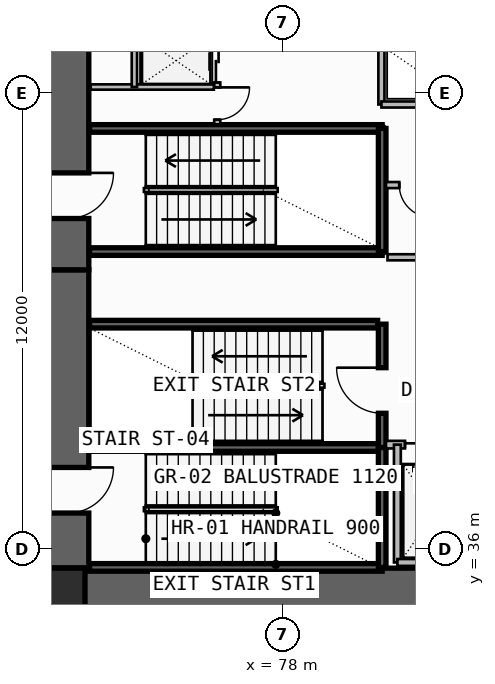
"""IFC4 building model, lengths in metres.
Left out: names, types, materials, properties, quantities, classifications, styles, units other than length and angle.
Written with IfcOpenShell. Run it as: python <this file> out.ifc"""

import sys

from ifc_helpers import new_model, si_unit, direction, frame, frame_2d, origin, origin_2d, place, context, subcontext, project, spatial, rectangle, extrude, element, fill, save


model = new_model("IFC4")
c1 = context("Model", 3, precision=1e-05, world=origin(), true_north=direction((0.0, 1.0)))
c2 = subcontext(c1, "Body", "Model", "MODEL_VIEW")
j1 = project(units=[si_unit("LENGTHUNIT", "METRE"), si_unit("PLANEANGLEUNIT", "RADIAN")], contexts=[c1])
p1 = place(None, origin())
s1 = spatial("IfcSite", under=j1, at=p1, CompositionType="ELEMENT")
p2 = place(p1, origin())
s2 = spatial("IfcBuilding", under=s1, at=p2, CompositionType="ELEMENT")
p3 = place(p2, frame((0.0, 0.0, 4.5)))
s3 = spatial("IfcBuildingStorey", under=s2, at=p3, CompositionType="ELEMENT", Elevation=4.5)
p4 = place(p3, frame((72.35, 35.5, -0.32), z_axis=(0.0, 0.0, 1.0), x_axis=(0.0, 1.0, 0.0)))
e1 = element("IfcWall", 1, at=p4, inside=s3, PredefinedType="SHEAR", context=c2, shape_type="SweptSolid", body=[
    extrude(rectangle(XDim=7.85, YDim=1.1, at=frame_2d((3.925, 0.0))), origin(), (0.0, 0.0, 1.0), 4.5),
])
p5 = place(p4, frame((1.45, 0.0, 0.32)))
e2 = element("IfcOpeningElement", 2, at=p5, cuts=e1, PredefinedType="OPENING", context=c2, shape_type="SweptSolid", body=[
    extrude(rectangle(XDim=1.2, YDim=2.2, at=frame_2d((0.6, 1.1))), frame((0.0, 0.56, 0.0), z_axis=(0.0, -1.0, 0.0), x_axis=(1.0, 0.0, 0.0)), (0.0, 0.0, 1.0), 1.12),
])
p6 = place(p3, frame((71.8, 34.95, -0.32), z_axis=(0.0, 0.0, 1.0), x_axis=(1.0, 0.0, 0.0)))
e3 = element("IfcWall", 3, at=p6, inside=s3, PredefinedType="SHEAR", context=c2, shape_type="SweptSolid", body=[
    extrude(rectangle(XDim=14.3, YDim=1.1, at=frame_2d((7.15, 0.0))), origin(), (0.0, 0.0, 1.0), 4.5),
])
p7 = place(p3, frame((72.35, 43.35, -0.32), z_axis=(0.0, 0.0, 1.0), x_axis=(0.0, 1.0, 0.0)))
e4 = element("IfcWall", 4, at=p7, inside=s3, PredefinedType="SHEAR", context=c2, shape_type="SweptSolid", body=[
    extrude(rectangle(XDim=12.7, YDim=1.1, at=frame_2d((6.35, 0.0))), origin(), (0.0, 0.0, 1.0), 4.5),
])
p8 = place(p7, frame((1.35, 0.0, 0.32)))
e5 = element("IfcOpeningElement", 5, at=p8, cuts=e4, PredefinedType="OPENING", context=c2, shape_type="SweptSolid", body=[
    extrude(rectangle(XDim=1.2, YDim=2.2, at=frame_2d((0.6, 1.1))), frame((0.0, 0.56, 0.0), z_axis=(0.0, -1.0, 0.0), x_axis=(1.0, 0.0, 0.0)), (0.0, 0.0, 1.0), 1.12),
])
p9 = place(p3, frame((72.0, 34.7, 0.0), z_axis=(0.0, 0.0, 1.0), x_axis=(1.0, 0.0, 0.0)))
e6 = element("IfcColumn", 6, at=p9, inside=s3, PredefinedType="COLUMN", context=c2, shape_type="SweptSolid", body=[
    extrude(rectangle(XDim=1.6, YDim=1.6, at=origin_2d()), origin(), (0.0, 0.0, 1.0), 4.5),
])
for number, where, z_axis, x_axis in (
    (7, (72.92, 35.52, -0.32), (0.0, 0.0, 1.0), (1.0, 0.0, 0.0)),
    (8, (72.92, 38.675, -0.32), (0.0, 0.0, 1.0), (1.0, 0.0, 0.0)),
):
    element("IfcWall", number, at=place(p3, frame(where, z_axis=z_axis, x_axis=x_axis)), inside=s3, PredefinedType="SOLIDWALL", context=c2, shape_type="SweptSolid", body=[
        extrude(rectangle(XDim=7.7, YDim=0.2, at=frame_2d((3.85, 0.0))), origin(), (0.0, 0.0, 1.0), 4.5),
    ])
p10 = place(p3, frame((80.62, 35.52, -0.32), z_axis=(0.0, 0.0, 1.0), x_axis=(0.0, 1.0, 0.0)))
e9 = element("IfcWall", 9, at=p10, inside=s3, PredefinedType="SOLIDWALL", context=c2, shape_type="SweptSolid", body=[
    extrude(rectangle(XDim=3.155, YDim=0.2, at=frame_2d((1.578, 0.0))), origin(), (0.0, 0.0, 1.0), 4.5),
])
p11 = place(p3, frame((80.62, 38.675, -0.32), z_axis=(0.0, 0.0, 1.0), x_axis=(0.0, 1.0, 0.0)))
e10 = element("IfcWall", 10, at=p11, inside=s3, PredefinedType="SOLIDWALL", context=c2, shape_type="SweptSolid", body=[
    extrude(rectangle(XDim=3.245, YDim=0.2, at=frame_2d((1.623, 0.0))), origin(), (0.0, 0.0, 1.0), 4.5),
])
p12 = place(p11, frame((0.9, 0.0, 0.32)))
e11 = element("IfcOpeningElement", 11, at=p12, cuts=e10, PredefinedType="OPENING", context=c2, shape_type="SweptSolid", body=[
    extrude(rectangle(XDim=1.2, YDim=2.2, at=frame_2d((0.6, 1.1))), frame((0.0, 0.11, 0.0), z_axis=(0.0, -1.0, 0.0), x_axis=(1.0, 0.0, 0.0)), (0.0, 0.0, 1.0), 0.22),
])
p13 = place(p3, frame((80.72, 38.75, 0.0), z_axis=(0.0, 0.0, 1.0), x_axis=(1.0, 0.0, 0.0)))
e12 = element("IfcWall", 12, at=p13, inside=s3, PredefinedType="SOLIDWALL", context=c2, shape_type="SweptSolid", body=[
    extrude(rectangle(XDim=4.26, YDim=0.2, at=frame_2d((2.13, 0.0))), origin(), (0.0, 0.0, 1.0), 4.18),
])
p14 = place(p13, frame((0.5, 0.0, 0.0)))
e13 = element("IfcOpeningElement", 13, at=p14, cuts=e12, PredefinedType="OPENING", context=c2, shape_type="SweptSolid", body=[
    extrude(rectangle(XDim=1.3, YDim=2.3, at=frame_2d((0.65, 1.15))), frame((0.0, 0.11, 0.0), z_axis=(0.0, -1.0, 0.0), x_axis=(1.0, 0.0, 0.0)), (0.0, 0.0, 1.0), 0.22),
])
p15 = place(p13, frame((2.45, 0.0, 0.0)))
e14 = element("IfcOpeningElement", 14, at=p15, cuts=e12, PredefinedType="OPENING", context=c2, shape_type="SweptSolid", body=[
    extrude(rectangle(XDim=1.3, YDim=2.3, at=frame_2d((0.65, 1.15))), frame((0.0, 0.11, 0.0), z_axis=(0.0, -1.0, 0.0), x_axis=(1.0, 0.0, 0.0)), (0.0, 0.0, 1.0), 0.22),
])
p16 = place(p3, frame((81.02, 35.65, 0.0), z_axis=(0.0, 0.0, 1.0), x_axis=(0.0, 1.0, 0.0)))
e15 = element("IfcWall", 15, at=p16, inside=s3, PredefinedType="SOLIDWALL", context=c2, shape_type="SweptSolid", body=[
    extrude(rectangle(XDim=3.1, YDim=0.18, at=frame_2d((1.55, 0.0))), origin(), (0.0, 0.0, 1.0), 4.18),
])
p17 = place(p3, frame((81.02, 35.65, 0.0), z_axis=(0.0, 0.0, 1.0), x_axis=(1.0, 0.0, 0.0)))
e16 = element("IfcWall", 16, at=p17, inside=s3, PredefinedType="SOLIDWALL", context=c2, shape_type="SweptSolid", body=[
    extrude(rectangle(XDim=3.93, YDim=0.18, at=frame_2d((1.965, 0.0))), origin(), (0.0, 0.0, 1.0), 4.18),
])
p18 = place(p3, frame((72.92, 41.92, -0.32), z_axis=(0.0, 0.0, 1.0), x_axis=(1.0, 0.0, 0.0)))
e17 = element("IfcWall", 17, at=p18, inside=s3, PredefinedType="SOLIDWALL", context=c2, shape_type="SweptSolid", body=[
    extrude(rectangle(XDim=7.58, YDim=0.2, at=frame_2d((3.79, 0.0))), origin(), (0.0, 0.0, 1.0), 4.5),
])
for number, where, z_axis, x_axis in (
    (18, (72.92, 43.83, -0.32), (0.0, 0.0, 1.0), (1.0, 0.0, 0.0)),
    (19, (72.92, 47.07, -0.32), (0.0, 0.0, 1.0), (1.0, 0.0, 0.0)),
):
    element("IfcWall", number, at=place(p3, frame(where, z_axis=z_axis, x_axis=x_axis)), inside=s3, PredefinedType="SOLIDWALL", context=c2, shape_type="SweptSolid", body=[
        extrude(rectangle(XDim=7.7, YDim=0.2, at=frame_2d((3.85, 0.0))), origin(), (0.0, 0.0, 1.0), 4.5),
    ])
p19 = place(p3, frame((80.62, 43.83, -0.32), z_axis=(0.0, 0.0, 1.0), x_axis=(0.0, 1.0, 0.0)))
e20 = element("IfcWall", 20, at=p19, inside=s3, PredefinedType="SOLIDWALL", context=c2, shape_type="SweptSolid", body=[
    extrude(rectangle(XDim=3.24, YDim=0.2, at=frame_2d((1.62, 0.0))), origin(), (0.0, 0.0, 1.0), 4.5),
])
p20 = place(p3, frame((80.72, 45.58, 0.0), z_axis=(0.0, 0.0, 1.0), x_axis=(1.0, 0.0, 0.0)))
e21 = element("IfcWall", 21, at=p20, inside=s3, PredefinedType="PLUMBINGWALL", context=c2, shape_type="SweptSolid", body=[
    extrude(rectangle(XDim=4.23, YDim=0.16, at=frame_2d((2.115, 0.0))), origin(), (0.0, 0.0, 1.0), 4.18),
])
p21 = place(p20, frame((0.35, 0.0, 0.0)))
e22 = element("IfcOpeningElement", 22, at=p21, cuts=e21, PredefinedType="OPENING", context=c2, shape_type="SweptSolid", body=[
    extrude(rectangle(XDim=0.85, YDim=2.05, at=frame_2d((0.425, 1.025))), frame((0.0, 0.09, 0.0), z_axis=(0.0, -1.0, 0.0), x_axis=(1.0, 0.0, 0.0)), (0.0, 0.0, 1.0), 0.18),
])
p22 = place(p20, frame((2.35, 0.0, 0.0)))
e23 = element("IfcOpeningElement", 23, at=p22, cuts=e21, PredefinedType="OPENING", context=c2, shape_type="SweptSolid", body=[
    extrude(rectangle(XDim=0.9, YDim=2.1, at=frame_2d((0.45, 1.05))), frame((0.0, 0.09, 0.0), z_axis=(0.0, -1.0, 0.0), x_axis=(1.0, 0.0, 0.0)), (0.0, 0.0, 1.0), 0.18),
])
p23 = place(p3, frame((80.76, 43.68, 0.0), z_axis=(0.0, 0.0, 1.0), x_axis=(1.0, 0.0, 0.0)))
e24 = element("IfcWall", 24, at=p23, inside=s3, PredefinedType="PLUMBINGWALL", context=c2, shape_type="SweptSolid", body=[
    extrude(rectangle(XDim=4.19, YDim=0.16, at=frame_2d((2.095, 0.0))), origin(), (0.0, 0.0, 1.0), 4.18),
])
p24 = place(p3, frame((76.28, 47.18, 0.0), z_axis=(0.0, 0.0, 1.0), x_axis=(0.0, 1.0, 0.0)))
e25 = element("IfcWall", 25, at=p24, inside=s3, PredefinedType="SOLIDWALL", context=c2, shape_type="SweptSolid", body=[
    extrude(rectangle(XDim=5.14, YDim=0.16, at=frame_2d((2.57, 0.0))), origin(), (0.0, 0.0, 1.0), 4.18),
])
p25 = place(p24, frame((1.1, 0.0, 0.0)))
e26 = element("IfcOpeningElement", 26, at=p25, cuts=e25, PredefinedType="OPENING", context=c2, shape_type="SweptSolid", body=[
    extrude(rectangle(XDim=1.1, YDim=2.25, at=frame_2d((0.55, 1.125))), frame((0.0, 0.09, 0.0), z_axis=(0.0, -1.0, 0.0), x_axis=(1.0, 0.0, 0.0)), (0.0, 0.0, 1.0), 0.18),
])
p26 = place(p24, frame((2.5, 0.0, 0.0)))
e27 = element("IfcOpeningElement", 27, at=p26, cuts=e25, PredefinedType="OPENING", context=c2, shape_type="SweptSolid", body=[
    extrude(rectangle(XDim=1.1, YDim=2.25, at=frame_2d((0.55, 1.125))), frame((0.0, 0.09, 0.0), z_axis=(0.0, -1.0, 0.0), x_axis=(1.0, 0.0, 0.0)), (0.0, 0.0, 1.0), 0.18),
])
p27 = place(p24, frame((3.9, 0.0, 0.0)))
e28 = element("IfcOpeningElement", 28, at=p27, cuts=e25, PredefinedType="OPENING", context=c2, shape_type="SweptSolid", body=[
    extrude(rectangle(XDim=1.1, YDim=2.25, at=frame_2d((0.55, 1.125))), frame((0.0, 0.09, 0.0), z_axis=(0.0, -1.0, 0.0), x_axis=(1.0, 0.0, 0.0)), (0.0, 0.0, 1.0), 0.18),
])
p28 = place(p24, frame((0.12, 0.0, 0.0)))
e29 = element("IfcOpeningElement", 29, at=p28, cuts=e25, PredefinedType="OPENING", context=c2, shape_type="SweptSolid", body=[
    extrude(rectangle(XDim=0.85, YDim=2.05, at=frame_2d((0.425, 1.025))), frame((0.0, 0.09, 0.0), z_axis=(0.0, -1.0, 0.0), x_axis=(1.0, 0.0, 0.0)), (0.0, 0.0, 1.0), 0.18),
])
p29 = place(p3, frame((72.95, 48.16, 0.0), z_axis=(0.0, 0.0, 1.0), x_axis=(1.0, 0.0, 0.0)))
e30 = element("IfcWall", 30, at=p29, inside=s3, PredefinedType="PLUMBINGWALL", context=c2, shape_type="SweptSolid", body=[
    extrude(rectangle(XDim=3.24, YDim=0.14, at=frame_2d((1.62, 0.0))), origin(), (0.0, 0.0, 1.0), 4.18),
])
p30 = place(p3, frame((74.1, 48.16, 0.0), z_axis=(0.0, 0.0, 1.0), x_axis=(0.0, 1.0, 0.0)))
e31 = element("IfcWall", 31, at=p30, inside=s3, PredefinedType="PLUMBINGWALL", context=c2, shape_type="SweptSolid", body=[
    extrude(rectangle(XDim=4.16, YDim=0.14, at=frame_2d((2.08, 0.0))), origin(), (0.0, 0.0, 1.0), 4.18),
])
p31 = place(p3, frame((80.6, 47.7, 0.0), z_axis=(0.0, 0.0, 1.0), x_axis=(0.0, 1.0, 0.0)))
e32 = element("IfcWall", 32, at=p31, inside=s3, PredefinedType="SOLIDWALL", context=c2, shape_type="SweptSolid", body=[
    extrude(rectangle(XDim=4.6, YDim=0.16, at=frame_2d((2.3, 0.0))), origin(), (0.0, 0.0, 1.0), 4.18),
])
p32 = place(p3, frame((80.6, 47.7, 0.0), z_axis=(0.0, 0.0, 1.0), x_axis=(1.0, 0.0, 0.0)))
e33 = element("IfcWall", 33, at=p32, inside=s3, PredefinedType="SOLIDWALL", context=c2, shape_type="SweptSolid", body=[
    extrude(rectangle(XDim=4.4, YDim=0.16, at=frame_2d((2.2, 0.0))), origin(), (0.0, 0.0, 1.0), 4.18),
])
p33 = place(p5, frame((1.2, 0.0, 0.0), z_axis=(0.0, 0.0, 1.0), x_axis=(-1.0, 0.0, 0.0)))
e34 = element("IfcDoor", 34, at=p33, inside=s3, OperationType="SINGLE_SWING_LEFT", PredefinedType="USERDEFINED", context=c2, shape_type="SweptSolid", body=[
    extrude(rectangle(XDim=1.2, YDim=2.2, at=frame_2d((0.6, 1.1))), frame((0.0, 0.025, 0.0), z_axis=(0.0, -1.0, 0.0), x_axis=(1.0, 0.0, 0.0)), (0.0, 0.0, 1.0), 0.05),
])
fill(e2, e34)
p34 = place(p12, origin())
e35 = element("IfcDoor", 35, at=p34, inside=s3, OperationType="SINGLE_SWING_RIGHT", PredefinedType="USERDEFINED", context=c2, shape_type="SweptSolid", body=[
    extrude(rectangle(XDim=1.2, YDim=2.2, at=frame_2d((0.6, 1.1))), frame((0.0, 0.025, 0.0), z_axis=(0.0, -1.0, 0.0), x_axis=(1.0, 0.0, 0.0)), (0.0, 0.0, 1.0), 0.05),
])
fill(e11, e35)
p35 = place(p14, origin())
e36 = element("IfcDoor", 36, at=p35, inside=s3, OperationType="DOUBLE_DOOR_SLIDING", PredefinedType="DOOR", context=c2, shape_type="SweptSolid", body=[
    extrude(rectangle(XDim=1.3, YDim=2.3, at=frame_2d((0.65, 1.15))), frame((0.0, 0.025, 0.0), z_axis=(0.0, -1.0, 0.0), x_axis=(1.0, 0.0, 0.0)), (0.0, 0.0, 1.0), 0.05),
])
fill(e13, e36)
p36 = place(p8, frame((1.2, 0.0, 0.0), z_axis=(0.0, 0.0, 1.0), x_axis=(-1.0, 0.0, 0.0)))
e37 = element("IfcDoor", 37, at=p36, inside=s3, OperationType="SINGLE_SWING_LEFT", PredefinedType="USERDEFINED", context=c2, shape_type="SweptSolid", body=[
    extrude(rectangle(XDim=1.2, YDim=2.2, at=frame_2d((0.6, 1.1))), frame((0.0, 0.025, 0.0), z_axis=(0.0, -1.0, 0.0), x_axis=(1.0, 0.0, 0.0)), (0.0, 0.0, 1.0), 0.05),
])
fill(e5, e37)
p37 = place(p21, frame((0.85, 0.0, 0.0), z_axis=(0.0, 0.0, 1.0), x_axis=(-1.0, 0.0, 0.0)))
e38 = element("IfcDoor", 38, at=p37, inside=s3, OperationType="SINGLE_SWING_LEFT", PredefinedType="DOOR", context=c2, shape_type="SweptSolid", body=[
    extrude(rectangle(XDim=0.85, YDim=2.05, at=frame_2d((0.425, 1.025))), frame((0.0, 0.025, 0.0), z_axis=(0.0, -1.0, 0.0), x_axis=(1.0, 0.0, 0.0)), (0.0, 0.0, 1.0), 0.05),
])
fill(e22, e38)
p38 = place(p25, origin())
e39 = element("IfcDoor", 39, at=p38, inside=s3, OperationType="DOUBLE_DOOR_SLIDING", PredefinedType="DOOR", context=c2, shape_type="SweptSolid", body=[
    extrude(rectangle(XDim=1.1, YDim=2.25, at=frame_2d((0.55, 1.125))), frame((0.0, 0.025, 0.0), z_axis=(0.0, -1.0, 0.0), x_axis=(1.0, 0.0, 0.0)), (0.0, 0.0, 1.0), 0.05),
])
fill(e26, e39)
p39 = place(p28, frame((0.85, 0.0, 0.0), z_axis=(0.0, 0.0, 1.0), x_axis=(-1.0, 0.0, 0.0)))
e40 = element("IfcDoor", 40, at=p39, inside=s3, OperationType="SINGLE_SWING_LEFT", PredefinedType="DOOR", context=c2, shape_type="SweptSolid", body=[
    extrude(rectangle(XDim=0.85, YDim=2.05, at=frame_2d((0.425, 1.025))), frame((0.0, 0.025, 0.0), z_axis=(0.0, -1.0, 0.0), x_axis=(1.0, 0.0, 0.0)), (0.0, 0.0, 1.0), 0.05),
])
fill(e29, e40)
save(model, sys.argv[1])
